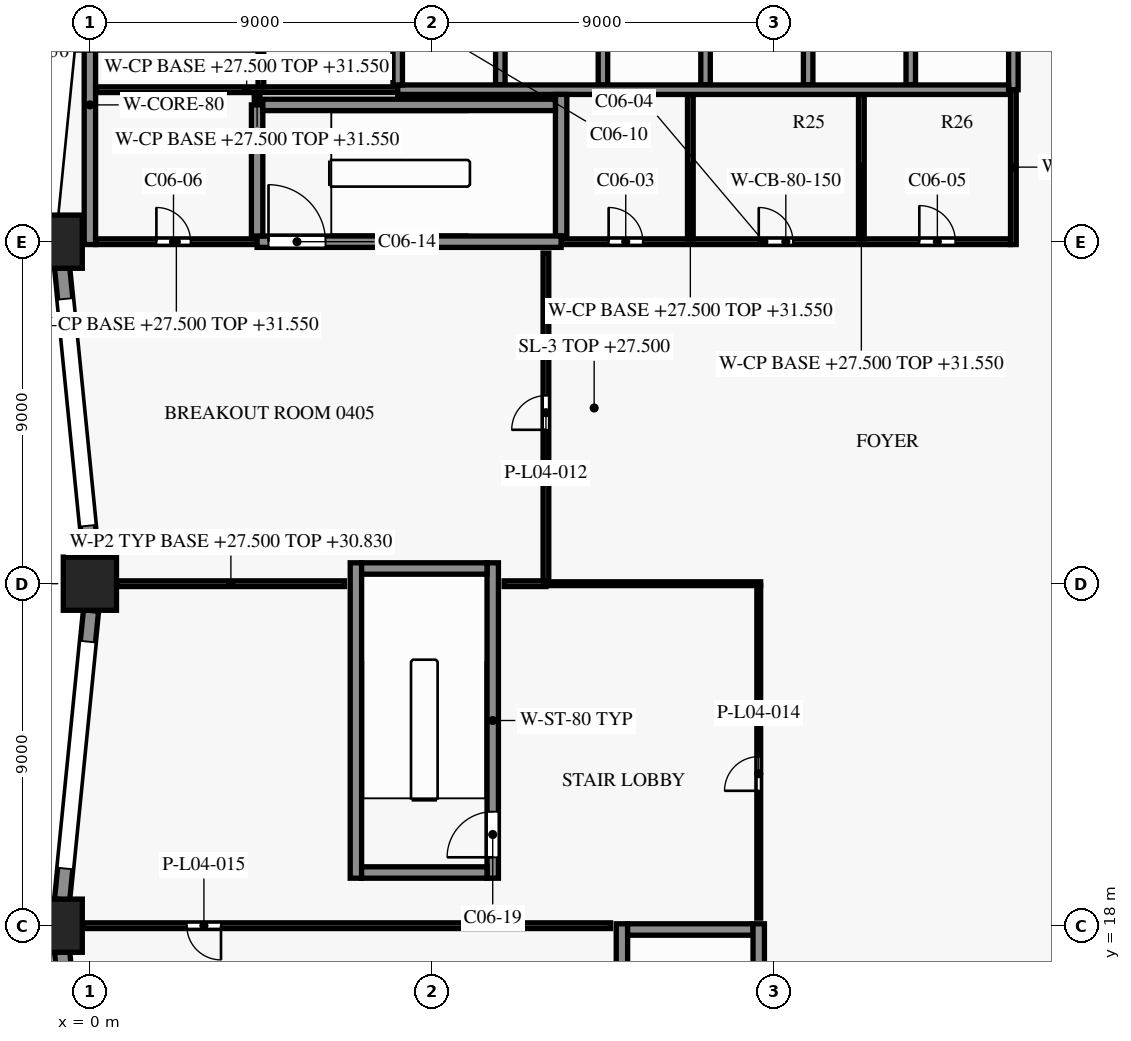
"""IFC4 building model, lengths in metres.
Left out: names, types, materials, properties, quantities, classifications, styles, units other than length and angle.
Written with IfcOpenShell. Run it as: python <this file> out.ifc"""

import sys

from ifc_helpers import new_model, si_unit, direction, frame, frame_2d, origin, origin_2d, place, context, subcontext, project, spatial, rectangle, extrude, element, fill, save


model = new_model("IFC4")
c1 = context("Model", 3, precision=1e-05, world=origin(), true_north=direction((0.0, 1.0)))
c2 = subcontext(c1, "Body", "Model", "MODEL_VIEW")
j1 = project(units=[si_unit("LENGTHUNIT", "METRE"), si_unit("PLANEANGLEUNIT", "RADIAN")], contexts=[c1])
p1 = place(None, origin())
s1 = spatial("IfcSite", under=j1, at=p1, CompositionType="ELEMENT")
p2 = place(p1, origin())
s2 = spatial("IfcBuilding", under=s1, at=p2, CompositionType="ELEMENT")
p3 = place(p2, frame((0.0, 0.0, 27.5)))
s3 = spatial("IfcBuildingStorey", under=s2, at=p3, CompositionType="ELEMENT", Elevation=27.5)
for number, where, z_axis, x_axis in (
    (1, (-0.9, 36.0, 0.0), (0.0, 0.0, 1.0), (1.0, 0.0, 0.0)),
    (2, (0.0, 27.0, 0.0), (0.0, 0.0, 1.0), (1.0, 0.0, 0.0)),
    (3, (-0.9, 18.0, 0.0), (0.0, 0.0, 1.0), (1.0, 0.0, 0.0)),
):
    element("IfcColumn", number, at=place(p3, frame(where, z_axis=z_axis, x_axis=x_axis)), inside=s3, PredefinedType="COLUMN", context=c2, shape_type="SweptSolid", body=[
        extrude(rectangle(XDim=1.4, YDim=1.4, at=origin_2d()), origin(), (0.0, 0.0, 1.0), 4.5),
    ])
p4 = place(p3, frame((0.03, 27.707, 0.0), z_axis=(0.0, 0.0, 1.0), x_axis=(-0.099478423711, 0.995039719416, 0.0)))
e4 = element("IfcWall", 4, at=p4, inside=s3, PredefinedType="SOLIDWALL", context=c2, shape_type="SweptSolid", body=[
    extrude(rectangle(XDim=7.645, YDim=0.4, at=frame_2d((3.822, 0.0))), origin(), (0.0, 0.0, 1.0), 3.6),
])
p5 = place(p4, frame((0.823, 0.0, 0.9)))
e5 = element("IfcOpeningElement", 5, at=p5, cuts=e4, PredefinedType="OPENING", context=c2, shape_type="SweptSolid", body=[
    extrude(rectangle(XDim=6.0, YDim=1.8, at=frame_2d((3.0, 0.9))), frame((0.0, 0.21, 0.0), z_axis=(0.0, -1.0, 0.0), x_axis=(1.0, 0.0, 0.0)), (0.0, 0.0, 1.0), 0.42),
])
p6 = place(p3, frame((-0.731, 18.687, 0.0), z_axis=(0.0, 0.0, 1.0), x_axis=(0.099478423711, 0.995039719416, 0.0)))
e6 = element("IfcWall", 6, at=p6, inside=s3, PredefinedType="SOLIDWALL", context=c2, shape_type="SweptSolid", body=[
    extrude(rectangle(XDim=7.645, YDim=0.4, at=frame_2d((3.822, 0.0))), origin(), (0.0, 0.0, 1.0), 3.6),
])
p7 = place(p6, frame((0.823, 0.0, 0.9)))
e7 = element("IfcOpeningElement", 7, at=p7, cuts=e6, PredefinedType="OPENING", context=c2, shape_type="SweptSolid", body=[
    extrude(rectangle(XDim=6.0, YDim=1.8, at=frame_2d((3.0, 0.9))), frame((0.0, 0.21, 0.0), z_axis=(0.0, -1.0, 0.0), x_axis=(1.0, 0.0, 0.0)), (0.0, 0.0, 1.0), 0.42),
])
p8 = place(p3, frame((0.03, 9.707, 0.0), z_axis=(0.0, 0.0, 1.0), x_axis=(-0.099478423711, 0.995039719416, 0.0)))
e8 = element("IfcWall", 8, at=p8, inside=s3, PredefinedType="SOLIDWALL", context=c2, shape_type="SweptSolid", body=[
    extrude(rectangle(XDim=7.645, YDim=0.4, at=frame_2d((3.822, 0.0))), origin(), (0.0, 0.0, 1.0), 3.6),
])
p9 = place(p8, frame((0.823, 0.0, 0.9)))
e9 = element("IfcOpeningElement", 9, at=p9, cuts=e8, PredefinedType="OPENING", context=c2, shape_type="SweptSolid", body=[
    extrude(rectangle(XDim=6.0, YDim=1.8, at=frame_2d((3.0, 0.9))), frame((0.0, 0.21, 0.0), z_axis=(0.0, -1.0, 0.0), x_axis=(1.0, 0.0, 0.0)), (0.0, 0.0, 1.0), 0.42),
])
for number, where, z_axis, x_axis in (
    (10, (14.15, 17.9, 0.0), (0.0, 0.0, 1.0), (1.0, 0.0, 0.0)),
    (11, (7.15, 19.4, 0.0), (0.0, 0.0, 1.0), (1.0, 0.0, 0.0)),
    (12, (7.15, 27.4, 0.0), (0.0, 0.0, 1.0), (1.0, 0.0, 0.0)),
):
    element("IfcWall", number, at=place(p3, frame(where, z_axis=z_axis, x_axis=x_axis)), inside=s3, PredefinedType="SHEAR", context=c2, shape_type="SweptSolid", body=[
        extrude(rectangle(XDim=3.3, YDim=0.3, at=frame_2d((1.65, 0.0))), origin(), (0.0, 0.0, 1.0), 4.2),
    ])
p10 = place(p3, frame((0.15, 36.0, 0.0), z_axis=(0.0, 0.0, 1.0), x_axis=(1.0, 0.0, 0.0)))
e13 = element("IfcWall", 13, at=p10, inside=s3, PredefinedType="PARTITIONING", context=c2, shape_type="SweptSolid", body=[
    extrude(rectangle(XDim=4.25, YDim=0.15, at=frame_2d((2.125, 0.0))), origin(), (0.0, 0.0, 1.0), 4.05),
])
p11 = place(p10, frame((1.6, 0.0, 0.0)))
e14 = element("IfcOpeningElement", 14, at=p11, cuts=e13, PredefinedType="OPENING", context=c2, shape_type="SweptSolid", body=[
    extrude(rectangle(XDim=0.9, YDim=2.1, at=frame_2d((0.45, 1.05))), frame((0.0, 0.085, 0.0), z_axis=(0.0, -1.0, 0.0), x_axis=(1.0, 0.0, 0.0)), (0.0, 0.0, 1.0), 0.17),
])
p12 = place(p3, frame((12.4, 36.0, 0.0), z_axis=(0.0, 0.0, 1.0), x_axis=(1.0, 0.0, 0.0)))
e15 = element("IfcWall", 15, at=p12, inside=s3, PredefinedType="SHEAR", context=c2, shape_type="SweptSolid", body=[
    extrude(rectangle(XDim=11.825, YDim=0.15, at=frame_2d((5.913, 0.0))), origin(), (0.0, 0.0, 1.0), 4.2),
])
p13 = place(p12, frame((1.25, 0.0, 0.0)))
e16 = element("IfcOpeningElement", 16, at=p13, cuts=e15, PredefinedType="OPENING", context=c2, shape_type="SweptSolid", body=[
    extrude(rectangle(XDim=0.9, YDim=2.1, at=frame_2d((0.45, 1.05))), frame((0.0, 0.085, 0.0), z_axis=(0.0, -1.0, 0.0), x_axis=(1.0, 0.0, 0.0)), (0.0, 0.0, 1.0), 0.17),
])
p14 = place(p12, frame((5.2, 0.0, 0.0)))
e17 = element("IfcOpeningElement", 17, at=p14, cuts=e15, PredefinedType="OPENING", context=c2, shape_type="SweptSolid", body=[
    extrude(rectangle(XDim=0.9, YDim=2.1, at=frame_2d((0.45, 1.05))), frame((0.0, 0.085, 0.0), z_axis=(0.0, -1.0, 0.0), x_axis=(1.0, 0.0, 0.0)), (0.0, 0.0, 1.0), 0.17),
])
p15 = place(p12, frame((9.425, 0.0, 0.0)))
e18 = element("IfcOpeningElement", 18, at=p15, cuts=e15, PredefinedType="OPENING", context=c2, shape_type="SweptSolid", body=[
    extrude(rectangle(XDim=0.95, YDim=2.1, at=frame_2d((0.475, 1.05))), frame((0.0, 0.085, 0.0), z_axis=(0.0, -1.0, 0.0), x_axis=(1.0, 0.0, 0.0)), (0.0, 0.0, 1.0), 0.17),
])
p16 = place(p3, frame((4.4, 36.0, 0.0), z_axis=(0.0, 0.0, 1.0), x_axis=(1.0, 0.0, 0.0)))
e19 = element("IfcWall", 19, at=p16, inside=s3, PredefinedType="SHEAR", context=c2, shape_type="SweptSolid", body=[
    extrude(rectangle(XDim=8.0, YDim=0.3, at=frame_2d((4.0, 0.0))), origin(), (0.0, 0.0, 1.0), 4.2),
])
p17 = place(p16, frame((0.3, 0.0, 0.0)))
e20 = element("IfcOpeningElement", 20, at=p17, cuts=e19, PredefinedType="OPENING", context=c2, shape_type="SweptSolid", body=[
    extrude(rectangle(XDim=1.5, YDim=2.2, at=frame_2d((0.75, 1.1))), frame((0.0, 0.16, 0.0), z_axis=(0.0, -1.0, 0.0), x_axis=(1.0, 0.0, 0.0)), (0.0, 0.0, 1.0), 0.32),
])
p18 = place(p3, frame((4.55, 39.6, 0.0), z_axis=(0.0, 0.0, 1.0), x_axis=(1.0, 0.0, 0.0)))
e21 = element("IfcWall", 21, at=p18, inside=s3, PredefinedType="SHEAR", context=c2, shape_type="SweptSolid", body=[
    extrude(rectangle(XDim=7.7, YDim=0.3, at=frame_2d((3.85, 0.0))), origin(), (0.0, 0.0, 1.0), 4.2),
])
p19 = place(p3, frame((0.15, 40.0, 0.0), z_axis=(0.0, 0.0, 1.0), x_axis=(1.0, 0.0, 0.0)))
e22 = element("IfcWall", 22, at=p19, inside=s3, PredefinedType="PARTITIONING", context=c2, shape_type="SweptSolid", body=[
    extrude(rectangle(XDim=7.95, YDim=0.15, at=frame_2d((3.975, 0.0))), origin(), (0.0, 0.0, 1.0), 4.05),
])
p20 = place(p3, frame((8.1, 40.0, 0.0), z_axis=(0.0, 0.0, 1.0), x_axis=(1.0, 0.0, 0.0)))
e23 = element("IfcWall", 23, at=p20, inside=s3, PredefinedType="SHEAR", context=c2, shape_type="SweptSolid", body=[
    extrude(rectangle(XDim=16.075, YDim=0.25, at=frame_2d((8.038, 0.0))), origin(), (0.0, 0.0, 1.0), 4.2),
])
p21 = place(p3, frame((0.0, 35.925, 0.0), z_axis=(0.0, 0.0, 1.0), x_axis=(0.0, 1.0, 0.0)))
e24 = element("IfcWall", 24, at=p21, inside=s3, PredefinedType="SHEAR", context=c2, shape_type="SweptSolid", body=[
    extrude(rectangle(XDim=7.35, YDim=0.3, at=frame_2d((3.675, 0.0))), origin(), (0.0, 0.0, 1.0), 4.2),
])
p22 = place(p3, frame((4.4, 39.6, 0.0), z_axis=(0.0, 0.0, 1.0), x_axis=(0.0, 1.0, 0.0)))
e25 = element("IfcWall", 25, at=p22, inside=s3, PredefinedType="PARTITIONING", context=c2, shape_type="SweptSolid", body=[
    extrude(rectangle(XDim=0.325, YDim=0.15, at=frame_2d((0.163, 0.0))), origin(), (0.0, 0.0, 1.0), 4.05),
])
p23 = place(p3, frame((4.4, 36.15, 0.0), z_axis=(0.0, 0.0, 1.0), x_axis=(0.0, 1.0, 0.0)))
e26 = element("IfcWall", 26, at=p23, inside=s3, PredefinedType="SHEAR", context=c2, shape_type="SweptSolid", body=[
    extrude(rectangle(XDim=3.45, YDim=0.3, at=frame_2d((1.725, 0.0))), origin(), (0.0, 0.0, 1.0), 4.2),
])
p24 = place(p3, frame((4.5, 40.075, 0.0), z_axis=(0.0, 0.0, 1.0), x_axis=(0.0, 1.0, 0.0)))
e27 = element("IfcWall", 27, at=p24, inside=s3, PredefinedType="PARTITIONING", context=c2, shape_type="SweptSolid", body=[
    extrude(rectangle(XDim=3.05, YDim=0.15, at=frame_2d((1.525, 0.0))), origin(), (0.0, 0.0, 1.0), 4.05),
])
p25 = place(p3, frame((7.0, 19.25, 0.0), z_axis=(0.0, 0.0, 1.0), x_axis=(0.0, 1.0, 0.0)))
e28 = element("IfcWall", 28, at=p25, inside=s3, PredefinedType="SHEAR", context=c2, shape_type="SweptSolid", body=[
    extrude(rectangle(XDim=8.3, YDim=0.3, at=frame_2d((4.15, 0.0))), origin(), (0.0, 0.0, 1.0), 4.2),
])
p26 = place(p3, frame((8.1, 40.125, 0.0), z_axis=(0.0, 0.0, 1.0), x_axis=(0.0, 1.0, 0.0)))
e29 = element("IfcWall", 29, at=p26, inside=s3, PredefinedType="SHEAR", context=c2, shape_type="SweptSolid", body=[
    extrude(rectangle(XDim=2.95, YDim=0.25, at=frame_2d((1.475, 0.0))), origin(), (0.0, 0.0, 1.0), 4.2),
])
p27 = place(p3, frame((10.6, 19.25, 0.0), z_axis=(0.0, 0.0, 1.0), x_axis=(0.0, 1.0, 0.0)))
e30 = element("IfcWall", 30, at=p27, inside=s3, PredefinedType="SHEAR", context=c2, shape_type="SweptSolid", body=[
    extrude(rectangle(XDim=8.3, YDim=0.3, at=frame_2d((4.15, 0.0))), origin(), (0.0, 0.0, 1.0), 4.2),
])
p28 = place(p27, frame((0.55, 0.0, 0.0)))
e31 = element("IfcOpeningElement", 31, at=p28, cuts=e30, PredefinedType="OPENING", context=c2, shape_type="SweptSolid", body=[
    extrude(rectangle(XDim=1.2, YDim=2.2, at=frame_2d((0.6, 1.1))), frame((0.0, 0.16, 0.0), z_axis=(0.0, -1.0, 0.0), x_axis=(1.0, 0.0, 0.0)), (0.0, 0.0, 1.0), 0.32),
])
p29 = place(p3, frame((10.8, 40.125, 0.0), z_axis=(0.0, 0.0, 1.0), x_axis=(0.0, 1.0, 0.0)))
e32 = element("IfcWall", 32, at=p29, inside=s3, PredefinedType="SHEAR", context=c2, shape_type="SweptSolid", body=[
    extrude(rectangle(XDim=2.95, YDim=0.25, at=frame_2d((1.475, 0.0))), origin(), (0.0, 0.0, 1.0), 4.2),
])
p30 = place(p3, frame((12.4, 36.15, 0.0), z_axis=(0.0, 0.0, 1.0), x_axis=(0.0, 1.0, 0.0)))
e33 = element("IfcWall", 33, at=p30, inside=s3, PredefinedType="SHEAR", context=c2, shape_type="SweptSolid", body=[
    extrude(rectangle(XDim=3.725, YDim=0.3, at=frame_2d((1.863, 0.0))), origin(), (0.0, 0.0, 1.0), 4.2),
])
p31 = place(p3, frame((13.5, 40.125, 0.0), z_axis=(0.0, 0.0, 1.0), x_axis=(0.0, 1.0, 0.0)))
e34 = element("IfcWall", 34, at=p31, inside=s3, PredefinedType="SHEAR", context=c2, shape_type="SweptSolid", body=[
    extrude(rectangle(XDim=2.95, YDim=0.25, at=frame_2d((1.475, 0.0))), origin(), (0.0, 0.0, 1.0), 4.2),
])
p32 = place(p3, frame((14.0, 9.75, 0.0), z_axis=(0.0, 0.0, 1.0), x_axis=(0.0, 1.0, 0.0)))
e35 = element("IfcWall", 35, at=p32, inside=s3, PredefinedType="SHEAR", context=c2, shape_type="SweptSolid", body=[
    extrude(rectangle(XDim=8.3, YDim=0.3, at=frame_2d((4.15, 0.0))), origin(), (0.0, 0.0, 1.0), 4.2),
])
p33 = place(p3, frame((15.8, 36.075, 0.0), z_axis=(0.0, 0.0, 1.0), x_axis=(0.0, 1.0, 0.0)))
e36 = element("IfcWall", 36, at=p33, inside=s3, PredefinedType="PARTITIONING", context=c2, shape_type="SweptSolid", body=[
    extrude(rectangle(XDim=3.8, YDim=0.15, at=frame_2d((1.9, 0.0))), origin(), (0.0, 0.0, 1.0), 4.05),
])
p34 = place(p3, frame((16.2, 40.125, 0.0), z_axis=(0.0, 0.0, 1.0), x_axis=(0.0, 1.0, 0.0)))
e37 = element("IfcWall", 37, at=p34, inside=s3, PredefinedType="SHEAR", context=c2, shape_type="SweptSolid", body=[
    extrude(rectangle(XDim=2.95, YDim=0.25, at=frame_2d((1.475, 0.0))), origin(), (0.0, 0.0, 1.0), 4.2),
])
p35 = place(p3, frame((17.6, 9.75, 0.0), z_axis=(0.0, 0.0, 1.0), x_axis=(0.0, 1.0, 0.0)))
e38 = element("IfcWall", 38, at=p35, inside=s3, PredefinedType="SHEAR", context=c2, shape_type="SweptSolid", body=[
    extrude(rectangle(XDim=8.3, YDim=0.3, at=frame_2d((4.15, 0.0))), origin(), (0.0, 0.0, 1.0), 4.2),
])
p36 = place(p35, frame((0.65, 0.0, 0.0)))
e39 = element("IfcOpeningElement", 39, at=p36, cuts=e38, PredefinedType="OPENING", context=c2, shape_type="SweptSolid", body=[
    extrude(rectangle(XDim=1.2, YDim=2.2, at=frame_2d((0.6, 1.1))), frame((0.0, 0.16, 0.0), z_axis=(0.0, -1.0, 0.0), x_axis=(1.0, 0.0, 0.0)), (0.0, 0.0, 1.0), 0.32),
])
p37 = place(p3, frame((18.9, 40.125, 0.0), z_axis=(0.0, 0.0, 1.0), x_axis=(0.0, 1.0, 0.0)))
e40 = element("IfcWall", 40, at=p37, inside=s3, PredefinedType="SHEAR", context=c2, shape_type="SweptSolid", body=[
    extrude(rectangle(XDim=2.95, YDim=0.25, at=frame_2d((1.475, 0.0))), origin(), (0.0, 0.0, 1.0), 4.2),
])
p38 = place(p3, frame((20.3, 36.075, 0.0), z_axis=(0.0, 0.0, 1.0), x_axis=(0.0, 1.0, 0.0)))
e41 = element("IfcWall", 41, at=p38, inside=s3, PredefinedType="PARTITIONING", context=c2, shape_type="SweptSolid", body=[
    extrude(rectangle(XDim=3.8, YDim=0.15, at=frame_2d((1.9, 0.0))), origin(), (0.0, 0.0, 1.0), 4.05),
])
p39 = place(p3, frame((21.6, 40.125, 0.0), z_axis=(0.0, 0.0, 1.0), x_axis=(0.0, 1.0, 0.0)))
e42 = element("IfcWall", 42, at=p39, inside=s3, PredefinedType="SHEAR", context=c2, shape_type="SweptSolid", body=[
    extrude(rectangle(XDim=2.95, YDim=0.25, at=frame_2d((1.475, 0.0))), origin(), (0.0, 0.0, 1.0), 4.2),
])
p40 = place(p3, frame((24.3, 35.925, 0.0), z_axis=(0.0, 0.0, 1.0), x_axis=(0.0, 1.0, 0.0)))
e43 = element("IfcWall", 43, at=p40, inside=s3, PredefinedType="SHEAR", context=c2, shape_type="SweptSolid", body=[
    extrude(rectangle(XDim=4.075, YDim=0.15, at=frame_2d((2.038, 0.0))), origin(), (0.0, 0.0, 1.0), 4.2),
])
p41 = place(p3, frame((24.3, 40.0, 0.0), z_axis=(0.0, 0.0, 1.0), x_axis=(0.0, 1.0, 0.0)))
e44 = element("IfcWall", 44, at=p41, inside=s3, PredefinedType="SHEAR", context=c2, shape_type="SweptSolid", body=[
    extrude(rectangle(XDim=3.325, YDim=0.25, at=frame_2d((1.663, 0.0))), origin(), (0.0, 0.0, 1.0), 4.2),
])
p42 = place(p3, frame((13.7, 18.0, 0.0), z_axis=(0.0, 0.0, 1.0), x_axis=(-1.0, 0.0, 0.0)))
e45 = element("IfcWall", 45, at=p42, inside=s3, PredefinedType="PARTITIONING", context=c2, shape_type="SweptSolid", body=[
    extrude(rectangle(XDim=13.88, YDim=0.15, at=frame_2d((6.94, 0.0))), origin(), (0.0, 0.0, 1.0), 3.33),
])
p43 = place(p42, frame((10.25, 0.0, 0.0)))
e46 = element("IfcOpeningElement", 46, at=p43, cuts=e45, PredefinedType="OPENING", context=c2, shape_type="SweptSolid", body=[
    extrude(rectangle(XDim=0.9, YDim=2.1, at=frame_2d((0.45, 1.05))), frame((0.0, 0.085, 0.0), z_axis=(0.0, -1.0, 0.0), x_axis=(1.0, 0.0, 0.0)), (0.0, 0.0, 1.0), 0.17),
])
p44 = place(p3, frame((17.6, 18.2, 0.0), z_axis=(0.0, 0.0, 1.0), x_axis=(0.0, 1.0, 0.0)))
e47 = element("IfcWall", 47, at=p44, inside=s3, PredefinedType="PARTITIONING", context=c2, shape_type="SweptSolid", body=[
    extrude(rectangle(XDim=8.75, YDim=0.1, at=frame_2d((4.375, 0.0))), origin(), (0.0, 0.0, 1.0), 3.33),
])
p45 = place(p44, frame((3.35, 0.0, 0.0)))
e48 = element("IfcOpeningElement", 48, at=p45, cuts=e47, PredefinedType="OPENING", context=c2, shape_type="SweptSolid", body=[
    extrude(rectangle(XDim=0.9, YDim=2.1, at=frame_2d((0.45, 1.05))), frame((0.0, 0.06, 0.0), z_axis=(0.0, -1.0, 0.0), x_axis=(1.0, 0.0, 0.0)), (0.0, 0.0, 1.0), 0.12),
])
p46 = place(p3, frame((0.72, 27.0, 0.0), z_axis=(0.0, 0.0, 1.0), x_axis=(1.0, 0.0, 0.0)))
e49 = element("IfcWall", 49, at=p46, inside=s3, PredefinedType="PARTITIONING", context=c2, shape_type="SweptSolid", body=[
    extrude(rectangle(XDim=5.98, YDim=0.15, at=frame_2d((2.99, 0.0))), origin(), (0.0, 0.0, 1.0), 3.33),
])
p47 = place(p3, frame((10.9, 27.0, 0.0), z_axis=(0.0, 0.0, 1.0), x_axis=(1.0, 0.0, 0.0)))
e50 = element("IfcWall", 50, at=p47, inside=s3, PredefinedType="PARTITIONING", context=c2, shape_type="SweptSolid", body=[
    extrude(rectangle(XDim=1.1, YDim=0.15, at=frame_2d((0.55, 0.0))), origin(), (0.0, 0.0, 1.0), 3.33),
])
p48 = place(p3, frame((17.65, 27.0, 0.0), z_axis=(0.0, 0.0, 1.0), x_axis=(-1.0, 0.0, 0.0)))
e51 = element("IfcWall", 51, at=p48, inside=s3, PredefinedType="PARTITIONING", context=c2, shape_type="SweptSolid", body=[
    extrude(rectangle(XDim=5.65, YDim=0.1, at=frame_2d((2.825, 0.0))), origin(), (0.0, 0.0, 1.0), 3.33),
])
p49 = place(p3, frame((12.0, 27.075, 0.0), z_axis=(0.0, 0.0, 1.0), x_axis=(0.0, 1.0, 0.0)))
e52 = element("IfcWall", 52, at=p49, inside=s3, PredefinedType="PARTITIONING", context=c2, shape_type="SweptSolid", body=[
    extrude(rectangle(XDim=8.625, YDim=0.15, at=frame_2d((4.312, 0.0))), origin(), (0.0, 0.0, 1.0), 3.33),
])
p50 = place(p49, frame((3.975, 0.0, 0.0)))
e53 = element("IfcOpeningElement", 53, at=p50, cuts=e52, PredefinedType="OPENING", context=c2, shape_type="SweptSolid", body=[
    extrude(rectangle(XDim=0.9, YDim=2.1, at=frame_2d((0.45, 1.05))), frame((0.0, 0.085, 0.0), z_axis=(0.0, -1.0, 0.0), x_axis=(1.0, 0.0, 0.0)), (0.0, 0.0, 1.0), 0.17),
])
p51 = place(p5, origin())
e54 = element("IfcWindow", 54, at=p51, inside=s3, PartitioningType="SINGLE_PANEL", PredefinedType="WINDOW", context=c2, shape_type="SweptSolid", body=[
    extrude(rectangle(XDim=6.0, YDim=1.8, at=frame_2d((3.0, 0.9))), frame((0.0, 0.03, 0.0), z_axis=(0.0, -1.0, 0.0), x_axis=(1.0, 0.0, 0.0)), (0.0, 0.0, 1.0), 0.06),
])
fill(e5, e54)
p52 = place(p7, origin())
e55 = element("IfcWindow", 55, at=p52, inside=s3, PartitioningType="SINGLE_PANEL", PredefinedType="WINDOW", context=c2, shape_type="SweptSolid", body=[
    extrude(rectangle(XDim=6.0, YDim=1.8, at=frame_2d((3.0, 0.9))), frame((0.0, 0.03, 0.0), z_axis=(0.0, -1.0, 0.0), x_axis=(1.0, 0.0, 0.0)), (0.0, 0.0, 1.0), 0.06),
])
fill(e7, e55)
p53 = place(p13, origin())
e56 = element("IfcDoor", 56, at=p53, inside=s3, OperationType="SINGLE_SWING_RIGHT", PredefinedType="DOOR", context=c2, shape_type="SweptSolid", body=[
    extrude(rectangle(XDim=0.9, YDim=2.1, at=frame_2d((0.45, 1.05))), frame((0.0, 0.025, 0.0), z_axis=(0.0, -1.0, 0.0), x_axis=(1.0, 0.0, 0.0)), (0.0, 0.0, 1.0), 0.05),
])
fill(e16, e56)
p54 = place(p14, origin())
e57 = element("IfcDoor", 57, at=p54, inside=s3, OperationType="SINGLE_SWING_LEFT", PredefinedType="DOOR", context=c2, shape_type="SweptSolid", body=[
    extrude(rectangle(XDim=0.9, YDim=2.1, at=frame_2d((0.45, 1.05))), frame((0.0, 0.025, 0.0), z_axis=(0.0, -1.0, 0.0), x_axis=(1.0, 0.0, 0.0)), (0.0, 0.0, 1.0), 0.05),
])
fill(e17, e57)
p55 = place(p15, origin())
e58 = element("IfcDoor", 58, at=p55, inside=s3, OperationType="SINGLE_SWING_RIGHT", PredefinedType="DOOR", context=c2, shape_type="SweptSolid", body=[
    extrude(rectangle(XDim=0.95, YDim=2.1, at=frame_2d((0.475, 1.05))), frame((0.0, 0.025, 0.0), z_axis=(0.0, -1.0, 0.0), x_axis=(1.0, 0.0, 0.0)), (0.0, 0.0, 1.0), 0.05),
])
fill(e18, e58)
p56 = place(p11, origin())
e59 = element("IfcDoor", 59, at=p56, inside=s3, OperationType="SINGLE_SWING_LEFT", PredefinedType="DOOR", context=c2, shape_type="SweptSolid", body=[
    extrude(rectangle(XDim=0.9, YDim=2.1, at=frame_2d((0.45, 1.05))), frame((0.0, 0.025, 0.0), z_axis=(0.0, -1.0, 0.0), x_axis=(1.0, 0.0, 0.0)), (0.0, 0.0, 1.0), 0.05),
])
fill(e14, e59)
p57 = place(p17, origin())
e60 = element("IfcDoor", 60, at=p57, inside=s3, OperationType="SINGLE_SWING_RIGHT", PredefinedType="DOOR", context=c2, shape_type="SweptSolid", body=[
    extrude(rectangle(XDim=1.5, YDim=2.2, at=frame_2d((0.75, 1.1))), frame((0.0, 0.025, 0.0), z_axis=(0.0, -1.0, 0.0), x_axis=(1.0, 0.0, 0.0)), (0.0, 0.0, 1.0), 0.05),
])
fill(e20, e60)
p58 = place(p28, origin())
e61 = element("IfcDoor", 61, at=p58, inside=s3, OperationType="SINGLE_SWING_RIGHT", PredefinedType="DOOR", context=c2, shape_type="SweptSolid", body=[
    extrude(rectangle(XDim=1.2, YDim=2.2, at=frame_2d((0.6, 1.1))), frame((0.0, 0.025, 0.0), z_axis=(0.0, -1.0, 0.0), x_axis=(1.0, 0.0, 0.0)), (0.0, 0.0, 1.0), 0.05),
])
fill(e31, e61)
p59 = place(p50, origin())
e62 = element("IfcDoor", 62, at=p59, inside=s3, OperationType="SINGLE_SWING_RIGHT", PredefinedType="DOOR", context=c2, shape_type="SweptSolid", body=[
    extrude(rectangle(XDim=0.9, YDim=2.1, at=frame_2d((0.45, 1.05))), frame((0.0, 0.025, 0.0), z_axis=(0.0, -1.0, 0.0), x_axis=(1.0, 0.0, 0.0)), (0.0, 0.0, 1.0), 0.05),
])
fill(e53, e62)
p60 = place(p45, origin())
e63 = element("IfcDoor", 63, at=p60, inside=s3, OperationType="SINGLE_SWING_LEFT", PredefinedType="DOOR", context=c2, shape_type="SweptSolid", body=[
    extrude(rectangle(XDim=0.9, YDim=2.1, at=frame_2d((0.45, 1.05))), frame((0.0, 0.025, 0.0), z_axis=(0.0, -1.0, 0.0), x_axis=(1.0, 0.0, 0.0)), (0.0, 0.0, 1.0), 0.05),
])
fill(e48, e63)
p61 = place(p43, origin())
e64 = element("IfcDoor", 64, at=p61, inside=s3, OperationType="SINGLE_SWING_RIGHT", PredefinedType="DOOR", context=c2, shape_type="SweptSolid", body=[
    extrude(rectangle(XDim=0.9, YDim=2.1, at=frame_2d((0.45, 1.05))), frame((0.0, 0.025, 0.0), z_axis=(0.0, -1.0, 0.0), x_axis=(1.0, 0.0, 0.0)), (0.0, 0.0, 1.0), 0.05),
])
fill(e46, e64)
save(model, sys.argv[1])
